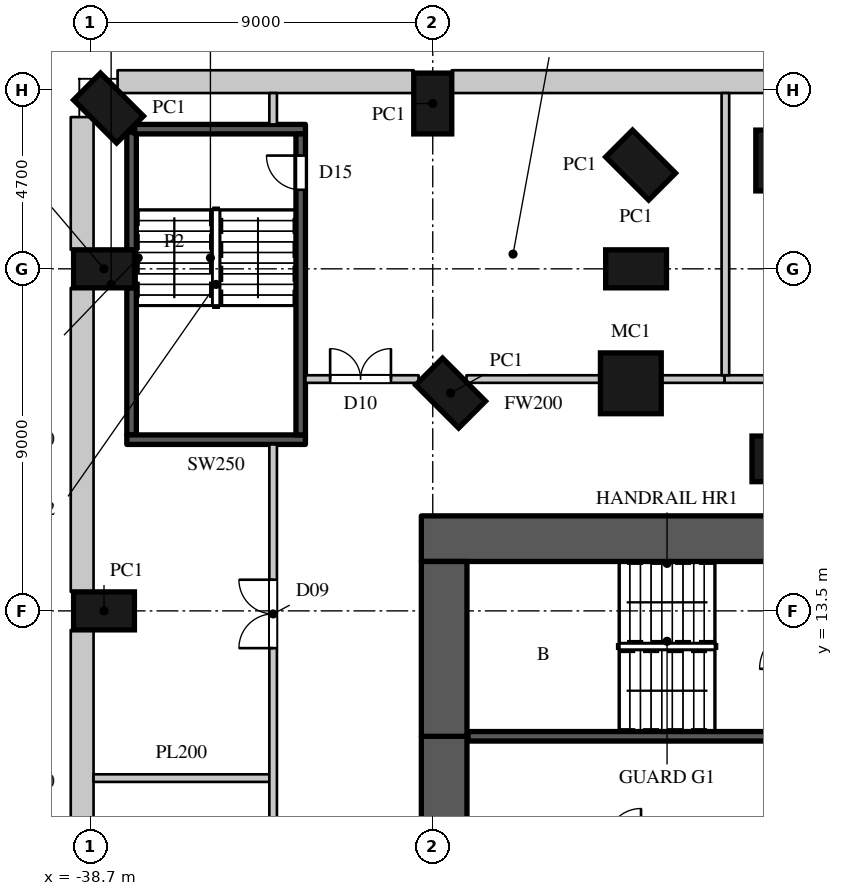
"""IFC4 building model, lengths in metres.
Left out: names, types, materials, properties, quantities, classifications, styles, units other than length and angle.
Written with IfcOpenShell. Run it as: python <this file> out.ifc"""

import sys

from ifc_helpers import new_model, si_unit, direction, frame, frame_2d, origin, origin_2d, place, context, subcontext, project, spatial, rectangle, circle, extrude, element, fill, save


model = new_model("IFC4")
c1 = context("Model", 3, precision=1e-05, world=origin(), true_north=direction((0.0, 1.0)))
c2 = subcontext(c1, "Body", "Model", "MODEL_VIEW")
j1 = project(units=[si_unit("LENGTHUNIT", "METRE"), si_unit("PLANEANGLEUNIT", "RADIAN")], contexts=[c1])
p1 = place(None, origin())
s1 = spatial("IfcSite", under=j1, at=p1, CompositionType="ELEMENT")
p2 = place(p1, origin())
s2 = spatial("IfcBuilding", under=s1, at=p2, CompositionType="ELEMENT")
p3 = place(p2, frame((0.0, 0.0, 29.0)))
s3 = spatial("IfcBuildingStorey", under=s2, at=p3, CompositionType="ELEMENT", Elevation=29.0)
for number, where, z_axis, x_axis in (
    (1, (-29.231, 19.231, 0.0), (0.0, 0.0, 1.0), (-0.707, -0.707, 0.0)),
    (2, (-20.7, 25.35, 0.0), (0.0, 0.0, 1.0), (-1.0, 0.0, 0.0)),
    (3, (-24.231, 25.231, 0.0), (0.0, 0.0, 1.0), (-0.707, -0.707, 0.0)),
    (4, (-24.35, 22.5, 0.0), (0.0, 0.0, 1.0), (0.0, -1.0, 0.0)),
):
    element("IfcColumn", number, at=place(p3, frame(where, z_axis=z_axis, x_axis=x_axis)), inside=s3, PredefinedType="COLUMN", context=c2, shape_type="SweptSolid", body=[
        extrude(rectangle(XDim=1.0, YDim=1.6, at=origin_2d()), origin(), (0.0, 0.0, 1.0), 7.0),
    ])
p4 = place(p3, frame((-24.488, 19.488, 0.0), z_axis=(0.0, 0.0, 1.0), x_axis=(1.0, 0.0, 0.0)))
e5 = element("IfcColumn", 5, at=p4, inside=s3, PredefinedType="COLUMN", context=c2, shape_type="SweptSolid", body=[
    extrude(circle(Radius=0.8, at=origin_2d()), origin(), (0.0, 0.0, 1.0), 7.0),
])
for number, where, z_axis, x_axis in (
    (6, (-29.7, 26.85, 0.0), (0.0, 0.0, 1.0), (-1.0, 0.0, 0.0)),
    (7, (-38.231, 26.731, 0.0), (0.0, 0.0, 1.0), (-0.707, -0.707, 0.0)),
    (8, (-38.35, 22.5, 0.0), (0.0, 0.0, 1.0), (0.0, -1.0, 0.0)),
    (9, (-38.35, 13.5, 0.0), (0.0, 0.0, 1.0), (0.0, -1.0, 0.0)),
):
    element("IfcColumn", number, at=place(p3, frame(where, z_axis=z_axis, x_axis=x_axis)), inside=s3, PredefinedType="COLUMN", context=c2, shape_type="SweptSolid", body=[
        extrude(rectangle(XDim=1.0, YDim=1.6, at=origin_2d()), origin(), (0.0, 0.0, 1.0), 7.0),
    ])
p5 = place(p3, frame((-20.7, 17.5, 0.0), z_axis=(0.0, 0.0, 1.0), x_axis=(1.0, 0.0, 0.0)))
e10 = element("IfcColumn", 10, at=p5, inside=s3, PredefinedType="COLUMN", context=c2, shape_type="SweptSolid", body=[
    extrude(circle(Radius=0.6, at=origin_2d()), origin(), (0.0, 0.0, 1.0), 7.0),
])
p6 = place(p3, frame((24.334, 27.425, 0.0), z_axis=(0.0, 0.0, 1.0), x_axis=(-1.0, 0.0, 0.0)))
e11 = element("IfcWall", 11, at=p6, inside=s3, PredefinedType="ELEMENTEDWALL", context=c2, shape_type="SweptSolid", body=[
    extrude(rectangle(XDim=53.534, YDim=0.6, at=frame_2d((26.767, 0.0))), origin(), (0.0, 0.0, 1.0), 6.6),
])
p7 = place(p3, frame((-30.2, 27.425, 0.0), z_axis=(0.0, 0.0, 1.0), x_axis=(-1.0, 0.0, 0.0)))
e12 = element("IfcWall", 12, at=p7, inside=s3, PredefinedType="ELEMENTEDWALL", context=c2, shape_type="SweptSolid", body=[
    extrude(rectangle(XDim=7.793, YDim=0.6, at=frame_2d((3.896, 0.0))), origin(), (0.0, 0.0, 1.0), 6.6),
])
p8 = place(p3, frame((-38.925, 26.493, 0.0), z_axis=(0.0, 0.0, 1.0), x_axis=(0.0, -1.0, 0.0)))
e13 = element("IfcWall", 13, at=p8, inside=s3, PredefinedType="ELEMENTEDWALL", context=c2, shape_type="SweptSolid", body=[
    extrude(rectangle(XDim=3.493, YDim=0.6, at=frame_2d((1.747, 0.0))), origin(), (0.0, 0.0, 1.0), 6.6),
])
for number, where, z_axis, x_axis in (
    (14, (-38.925, 22.0, 0.0), (0.0, 0.0, 1.0), (0.0, -1.0, 0.0)),
    (15, (-38.925, 13.0, 0.0), (0.0, 0.0, 1.0), (0.0, -1.0, 0.0)),
):
    element("IfcWall", number, at=place(p3, frame(where, z_axis=z_axis, x_axis=x_axis)), inside=s3, PredefinedType="ELEMENTEDWALL", context=c2, shape_type="SweptSolid", body=[
        extrude(rectangle(XDim=8.0, YDim=0.6, at=frame_2d((4.0, 0.0))), origin(), (0.0, 0.0, 1.0), 6.6),
    ])
p9 = place(p3, frame((-30.0, 15.4, 0.0), z_axis=(0.0, 0.0, 1.0), x_axis=(1.0, 0.0, 0.0)))
e16 = element("IfcWall", 16, at=p9, inside=s3, PredefinedType="SHEAR", context=c2, shape_type="SweptSolid", body=[
    extrude(rectangle(XDim=16.0, YDim=1.2, at=frame_2d((8.0, 0.0))), origin(), (0.0, 0.0, 1.0), 7.0),
])
p10 = place(p3, frame((-29.4, -10.2, 0.0), z_axis=(0.0, 0.0, 1.0), x_axis=(0.0, 1.0, 0.0)))
e17 = element("IfcWall", 17, at=p10, inside=s3, PredefinedType="SHEAR", context=c2, shape_type="SweptSolid", body=[
    extrude(rectangle(XDim=20.4, YDim=1.2, at=frame_2d((10.2, 0.0))), origin(), (0.0, 0.0, 1.0), 7.0),
])
p11 = place(p3, frame((-29.4, 10.2, 0.0), z_axis=(0.0, 0.0, 1.0), x_axis=(0.0, 1.0, 0.0)))
e18 = element("IfcWall", 18, at=p11, inside=s3, PredefinedType="SHEAR", context=c2, shape_type="SweptSolid", body=[
    extrude(rectangle(XDim=4.6, YDim=1.2, at=frame_2d((2.3, 0.0))), origin(), (0.0, 0.0, 1.0), 7.0),
])
p12 = place(p3, frame((-33.05, 19.6, 0.0), z_axis=(0.0, 0.0, 1.0), x_axis=(1.0, 0.0, 0.0)))
e19 = element("IfcWall", 19, at=p12, inside=s3, PredefinedType="PARTITIONING", context=c2, shape_type="SweptSolid", body=[
    extrude(rectangle(XDim=2.977, YDim=0.2, at=frame_2d((1.489, 0.0))), origin(), (0.0, 0.0, 1.0), 6.598),
])
p13 = place(p12, frame((0.65, 0.0, 0.0)))
e20 = element("IfcOpeningElement", 20, at=p13, cuts=e19, PredefinedType="OPENING", context=c2, shape_type="SweptSolid", body=[
    extrude(rectangle(XDim=1.6, YDim=2.4, at=frame_2d((0.8, 1.2))), frame((0.0, 0.11, 0.0), z_axis=(0.0, -1.0, 0.0), x_axis=(1.0, 0.0, 0.0)), (0.0, 0.0, 1.0), 0.22),
])
p14 = place(p3, frame((-28.813, 19.6, 0.0), z_axis=(0.0, 0.0, 1.0), x_axis=(1.0, 0.0, 0.0)))
e21 = element("IfcWall", 21, at=p14, inside=s3, PredefinedType="PARTITIONING", context=c2, shape_type="SweptSolid", body=[
    extrude(rectangle(XDim=3.526, YDim=0.2, at=frame_2d((1.763, 0.0))), origin(), (0.0, 0.0, 1.0), 6.598),
])
p15 = place(p3, frame((-23.689, 19.6, 0.0), z_axis=(0.0, 0.0, 1.0), x_axis=(1.0, 0.0, 0.0)))
e22 = element("IfcWall", 22, at=p15, inside=s3, PredefinedType="PARTITIONING", context=c2, shape_type="SweptSolid", body=[
    extrude(rectangle(XDim=1.669, YDim=0.2, at=frame_2d((0.834, 0.0))), origin(), (0.0, 0.0, 1.0), 6.598),
])
p16 = place(p3, frame((-38.625, 9.1, 0.0), z_axis=(0.0, 0.0, 1.0), x_axis=(1.0, 0.0, 0.0)))
e23 = element("IfcWall", 23, at=p16, inside=s3, PredefinedType="PARTITIONING", context=c2, shape_type="SweptSolid", body=[
    extrude(rectangle(XDim=4.625, YDim=0.2, at=frame_2d((2.312, 0.0))), origin(), (0.0, 0.0, 1.0), 6.598),
])
p17 = place(p3, frame((-33.9, -17.88, 0.0), z_axis=(0.0, 0.0, 1.0), x_axis=(0.0, 1.0, 0.0)))
e24 = element("IfcWall", 24, at=p17, inside=s3, PredefinedType="PARTITIONING", context=c2, shape_type="SweptSolid", body=[
    extrude(rectangle(XDim=35.76, YDim=0.2, at=frame_2d((17.88, 0.0))), origin(), (0.0, 0.0, 1.0), 6.598),
])
p18 = place(p17, frame((3.55, 0.0, 0.0)))
e25 = element("IfcOpeningElement", 25, at=p18, cuts=e24, PredefinedType="OPENING", context=c2, shape_type="SweptSolid", body=[
    extrude(rectangle(XDim=1.8, YDim=2.4, at=frame_2d((0.9, 1.2))), frame((0.0, 0.11, 0.0), z_axis=(0.0, -1.0, 0.0), x_axis=(1.0, 0.0, 0.0)), (0.0, 0.0, 1.0), 0.22),
])
p19 = place(p17, frame((12.4, 0.0, 0.0)))
e26 = element("IfcOpeningElement", 26, at=p19, cuts=e24, PredefinedType="OPENING", context=c2, shape_type="SweptSolid", body=[
    extrude(rectangle(XDim=1.8, YDim=2.4, at=frame_2d((0.9, 1.2))), frame((0.0, 0.11, 0.0), z_axis=(0.0, -1.0, 0.0), x_axis=(1.0, 0.0, 0.0)), (0.0, 0.0, 1.0), 0.22),
])
p20 = place(p17, frame((21.5, 0.0, 0.0)))
e27 = element("IfcOpeningElement", 27, at=p20, cuts=e24, PredefinedType="OPENING", context=c2, shape_type="SweptSolid", body=[
    extrude(rectangle(XDim=1.8, YDim=2.4, at=frame_2d((0.9, 1.2))), frame((0.0, 0.11, 0.0), z_axis=(0.0, -1.0, 0.0), x_axis=(1.0, 0.0, 0.0)), (0.0, 0.0, 1.0), 0.22),
])
p21 = place(p17, frame((30.4, 0.0, 0.0)))
e28 = element("IfcOpeningElement", 28, at=p21, cuts=e24, PredefinedType="OPENING", context=c2, shape_type="SweptSolid", body=[
    extrude(rectangle(XDim=1.8, YDim=2.4, at=frame_2d((0.9, 1.2))), frame((0.0, 0.11, 0.0), z_axis=(0.0, -1.0, 0.0), x_axis=(1.0, 0.0, 0.0)), (0.0, 0.0, 1.0), 0.22),
])
p22 = place(p3, frame((-33.9, 26.3, 0.0), z_axis=(0.0, 0.0, 1.0), x_axis=(0.0, 1.0, 0.0)))
e29 = element("IfcWall", 29, at=p22, inside=s3, PredefinedType="PARTITIONING", context=c2, shape_type="SweptSolid", body=[
    extrude(rectangle(XDim=0.825, YDim=0.2, at=frame_2d((0.413, 0.0))), origin(), (0.0, 0.0, 1.0), 6.598),
])
p23 = place(p3, frame((-22.02, 19.6, 0.0), z_axis=(0.0, 0.0, 1.0), x_axis=(1.0, 0.0, 0.0)))
e30 = element("IfcWall", 30, at=p23, inside=s3, PredefinedType="PARTITIONING", context=c2, shape_type="SweptSolid", body=[
    extrude(rectangle(XDim=9.02, YDim=0.2, at=frame_2d((4.51, 0.0))), origin(), (0.0, 0.0, 1.0), 6.598),
])
p24 = place(p23, frame((3.6, 0.0, 0.0)))
e31 = element("IfcOpeningElement", 31, at=p24, cuts=e30, PredefinedType="OPENING", context=c2, shape_type="SweptSolid", body=[
    extrude(rectangle(XDim=1.8, YDim=2.4, at=frame_2d((0.9, 1.2))), frame((0.0, 0.11, 0.0), z_axis=(0.0, -1.0, 0.0), x_axis=(1.0, 0.0, 0.0)), (0.0, 0.0, 1.0), 0.22),
])
p25 = place(p3, frame((-22.0, 19.7, 0.0), z_axis=(0.0, 0.0, 1.0), x_axis=(0.0, 1.0, 0.0)))
e32 = element("IfcWall", 32, at=p25, inside=s3, PredefinedType="PARTITIONING", context=c2, shape_type="SweptSolid", body=[
    extrude(rectangle(XDim=7.425, YDim=0.2, at=frame_2d((3.712, 0.0))), origin(), (0.0, 0.0, 1.0), 6.598),
])
p26 = place(p3, frame((-37.625, 18.13, 0.0), z_axis=(0.0, 0.0, 1.0), x_axis=(0.0, 1.0, 0.0)))
e33 = element("IfcWall", 33, at=p26, inside=s3, PredefinedType="SHEAR", context=c2, shape_type="SweptSolid", body=[
    extrude(rectangle(XDim=3.87, YDim=0.25, at=frame_2d((1.935, 0.0))), origin(), (0.0, 0.0, 1.0), 6.6),
])
p27 = place(p3, frame((-37.625, 23.0, 0.0), z_axis=(0.0, 0.0, 1.0), x_axis=(0.0, 1.0, 0.0)))
e34 = element("IfcWall", 34, at=p27, inside=s3, PredefinedType="SHEAR", context=c2, shape_type="SweptSolid", body=[
    extrude(rectangle(XDim=3.095, YDim=0.25, at=frame_2d((1.548, 0.0))), origin(), (0.0, 0.0, 1.0), 6.6),
])
p28 = place(p3, frame((-37.75, 18.005, 0.0), z_axis=(0.0, 0.0, 1.0), x_axis=(1.0, 0.0, 0.0)))
e35 = element("IfcWall", 35, at=p28, inside=s3, PredefinedType="SHEAR", context=c2, shape_type="SweptSolid", body=[
    extrude(rectangle(XDim=4.7, YDim=0.25, at=frame_2d((2.35, 0.0))), origin(), (0.0, 0.0, 1.0), 6.6),
])
p29 = place(p3, frame((-37.545, 26.175, 0.0), z_axis=(0.0, 0.0, 1.0), x_axis=(1.0, 0.0, 0.0)))
e36 = element("IfcWall", 36, at=p29, inside=s3, PredefinedType="SHEAR", context=c2, shape_type="SweptSolid", body=[
    extrude(rectangle(XDim=4.495, YDim=0.25, at=frame_2d((2.248, 0.0))), origin(), (0.0, 0.0, 1.0), 6.6),
])
p30 = place(p3, frame((-33.175, 18.13, 0.0), z_axis=(0.0, 0.0, 1.0), x_axis=(0.0, 1.0, 0.0)))
e37 = element("IfcWall", 37, at=p30, inside=s3, PredefinedType="SHEAR", context=c2, shape_type="SweptSolid", body=[
    extrude(rectangle(XDim=7.92, YDim=0.25, at=frame_2d((3.96, 0.0))), origin(), (0.0, 0.0, 1.0), 6.6),
])
p31 = place(p30, frame((6.45, 0.0, 0.0)))
e38 = element("IfcOpeningElement", 38, at=p31, cuts=e37, PredefinedType="OPENING", context=c2, shape_type="SweptSolid", body=[
    extrude(rectangle(XDim=0.9, YDim=2.2, at=frame_2d((0.45, 1.1))), frame((0.0, 0.135, 0.0), z_axis=(0.0, -1.0, 0.0), x_axis=(1.0, 0.0, 0.0)), (0.0, 0.0, 1.0), 0.27),
])
p32 = place(p3, frame((-28.77, 10.2, 0.0), z_axis=(0.0, 0.0, 1.0), x_axis=(1.0, 0.0, 0.0)))
e39 = element("IfcWall", 39, at=p32, inside=s3, PredefinedType="SHEAR", context=c2, shape_type="SweptSolid", body=[
    extrude(rectangle(XDim=8.79, YDim=0.25, at=frame_2d((4.395, 0.0))), origin(), (0.0, 0.0, 1.0), 6.598),
])
p33 = place(p13, origin())
e40 = element("IfcDoor", 40, at=p33, inside=s3, OperationType="DOUBLE_DOOR_SINGLE_SWING", PredefinedType="DOOR", context=c2, shape_type="SweptSolid", body=[
    extrude(rectangle(XDim=1.6, YDim=2.4, at=frame_2d((0.8, 1.2))), frame((0.0, 0.025, 0.0), z_axis=(0.0, -1.0, 0.0), x_axis=(1.0, 0.0, 0.0)), (0.0, 0.0, 1.0), 0.05),
])
fill(e20, e40)
p34 = place(p21, origin())
e41 = element("IfcDoor", 41, at=p34, inside=s3, OperationType="DOUBLE_DOOR_SINGLE_SWING", PredefinedType="DOOR", context=c2, shape_type="SweptSolid", body=[
    extrude(rectangle(XDim=1.8, YDim=2.4, at=frame_2d((0.9, 1.2))), frame((0.0, 0.025, 0.0), z_axis=(0.0, -1.0, 0.0), x_axis=(1.0, 0.0, 0.0)), (0.0, 0.0, 1.0), 0.05),
])
fill(e28, e41)
p35 = place(p31, origin())
e42 = element("IfcDoor", 42, at=p35, inside=s3, OperationType="SINGLE_SWING_RIGHT", PredefinedType="DOOR", context=c2, shape_type="SweptSolid", body=[
    extrude(rectangle(XDim=0.9, YDim=2.2, at=frame_2d((0.45, 1.1))), frame((0.0, 0.025, 0.0), z_axis=(0.0, -1.0, 0.0), x_axis=(1.0, 0.0, 0.0)), (0.0, 0.0, 1.0), 0.05),
])
fill(e38, e42)
save(model, sys.argv[1])
